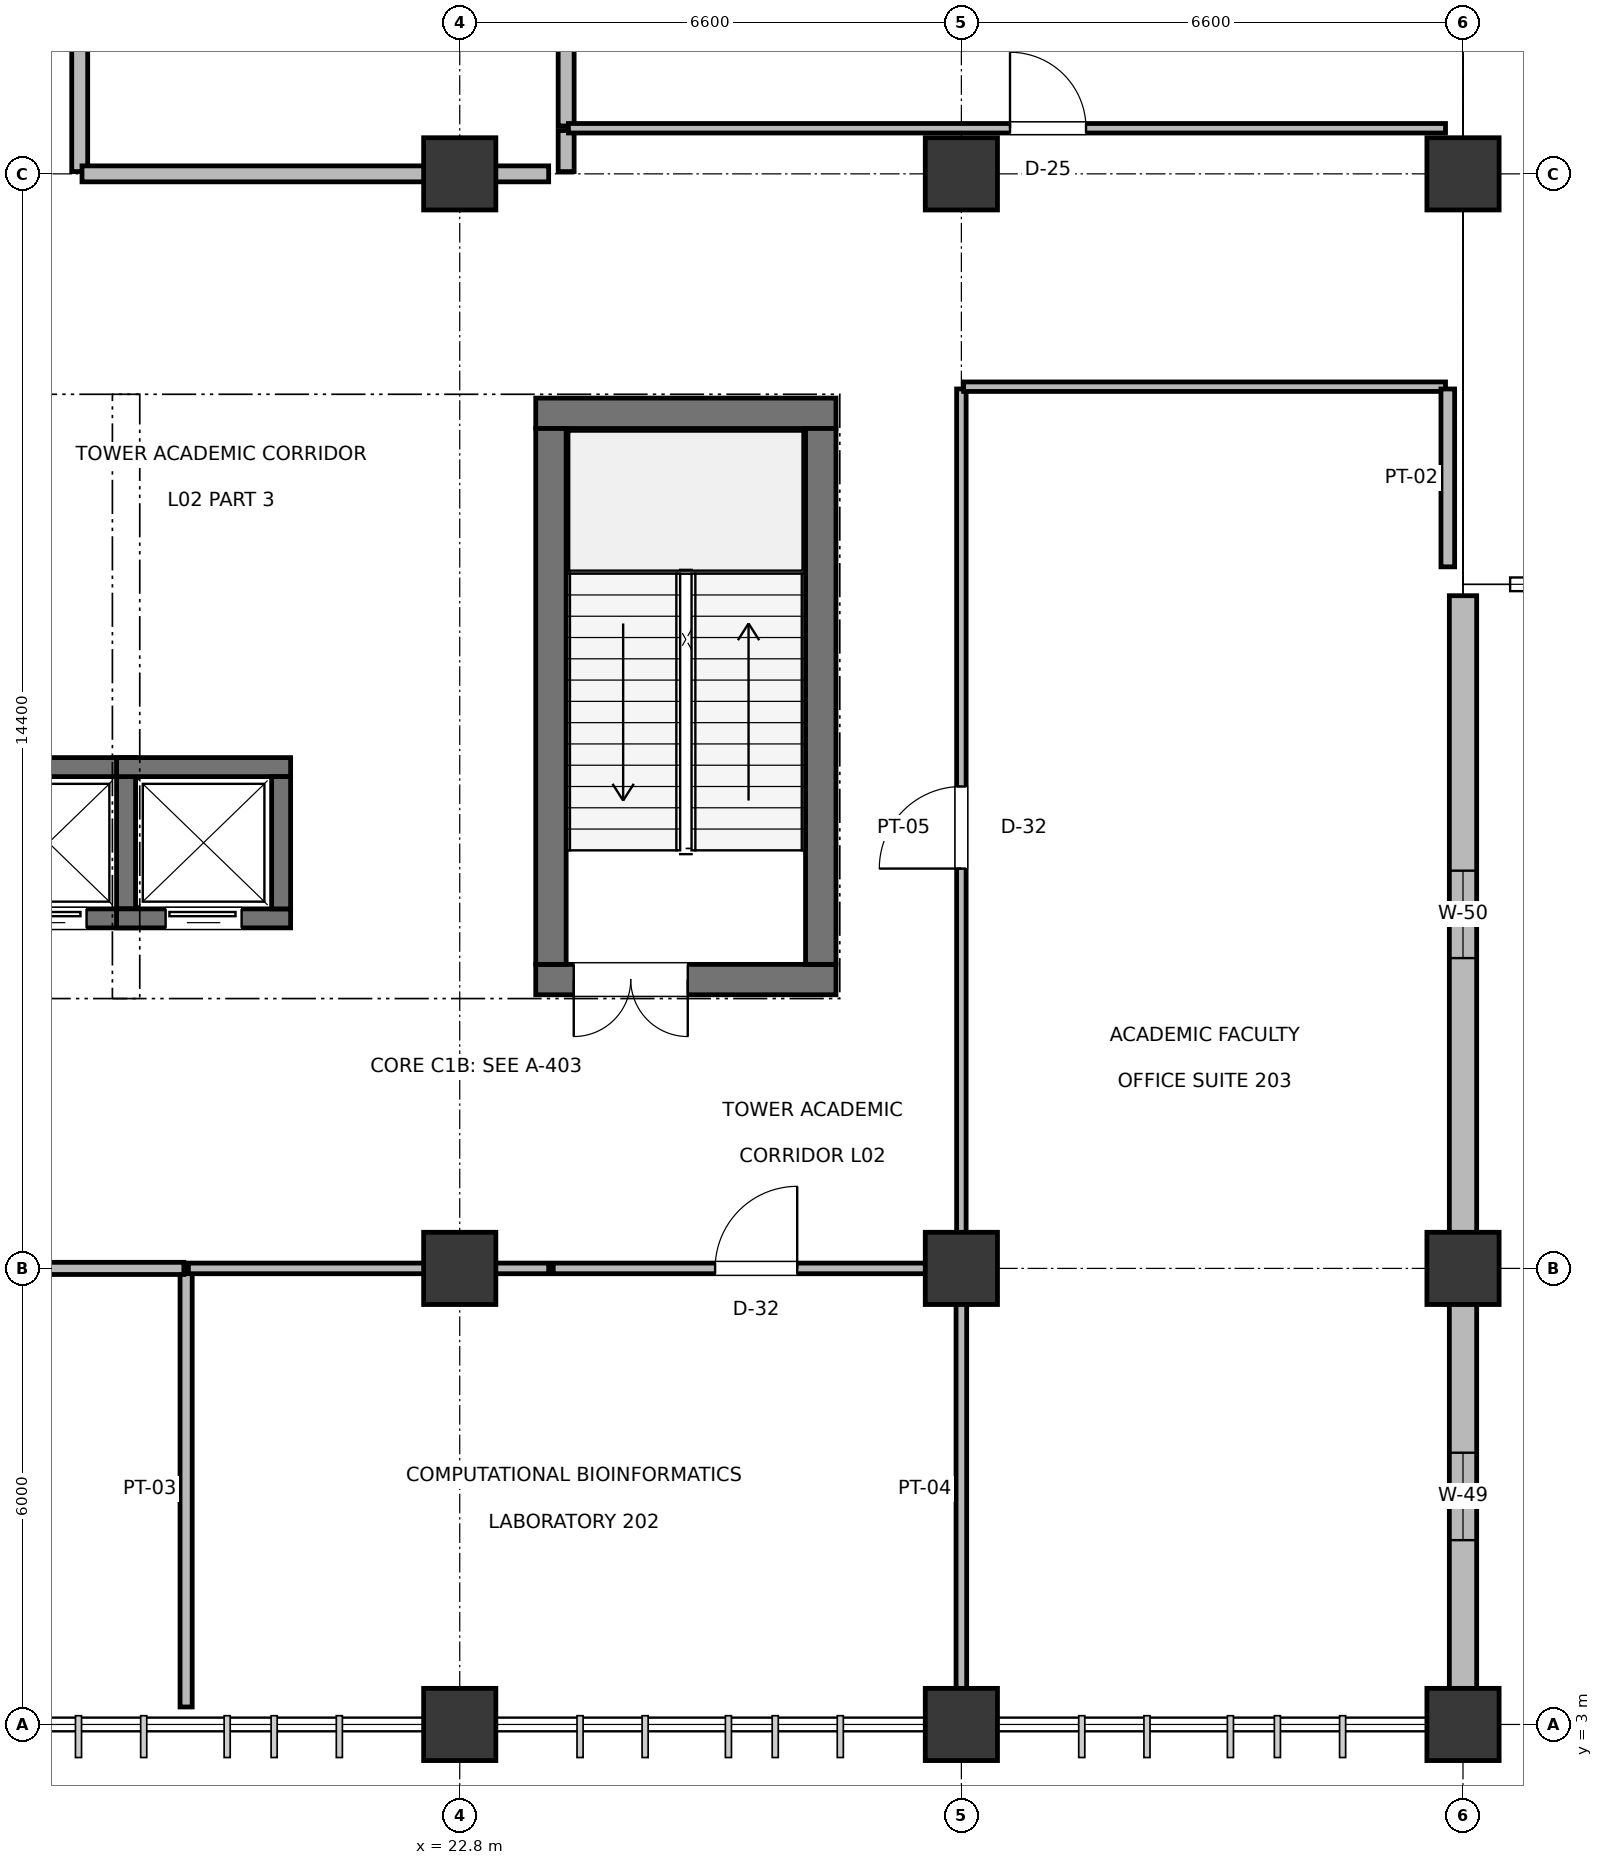
"""IFC4 building model, lengths in metres.
Left out: names, types, materials, properties, quantities, classifications, styles, units other than length and angle.
Written with IfcOpenShell. Run it as: python <this file> out.ifc"""

import sys

from ifc_helpers import new_model, si_unit, direction, frame, frame_2d, origin, origin_2d, place, context, subcontext, project, spatial, rectangle, extrude, element, fill, save


model = new_model("IFC4")
c1 = context("Model", 3, precision=1e-05, world=origin(), true_north=direction((0.0, 1.0)))
c2 = subcontext(c1, "Body", "Model", "MODEL_VIEW")
j1 = project(units=[si_unit("LENGTHUNIT", "METRE"), si_unit("PLANEANGLEUNIT", "RADIAN")], contexts=[c1])
p1 = place(None, origin())
s1 = spatial("IfcSite", under=j1, at=p1, CompositionType="ELEMENT")
p2 = place(p1, origin())
s2 = spatial("IfcBuilding", under=s1, at=p2, CompositionType="ELEMENT")
p3 = place(p2, frame((0.0, 0.0, 10.2)))
s3 = spatial("IfcBuildingStorey", under=s2, at=p3, CompositionType="ELEMENT", Elevation=10.2)
for number, where, z_axis, x_axis in (
    (1, (22.8, 3.0, 0.0), (0.0, 0.0, 1.0), (1.0, 0.0, 0.0)),
    (2, (22.8, 9.0, 0.0), (0.0, 0.0, 1.0), (1.0, 0.0, 0.0)),
    (3, (22.8, 23.4, 0.0), (0.0, 0.0, 1.0), (1.0, 0.0, 0.0)),
    (4, (29.4, 3.0, 0.0), (0.0, 0.0, 1.0), (1.0, 0.0, 0.0)),
    (5, (29.4, 9.0, 0.0), (0.0, 0.0, 1.0), (1.0, 0.0, 0.0)),
    (6, (29.4, 23.4, 0.0), (0.0, 0.0, 1.0), (1.0, 0.0, 0.0)),
    (7, (36.0, 3.0, 0.0), (0.0, 0.0, 1.0), (1.0, 0.0, 0.0)),
    (8, (36.0, 9.0, 0.0), (0.0, 0.0, 1.0), (1.0, 0.0, 0.0)),
    (9, (36.0, 23.4, 0.0), (0.0, 0.0, 1.0), (1.0, 0.0, 0.0)),
):
    element("IfcColumn", number, at=place(p3, frame(where, z_axis=z_axis, x_axis=x_axis)), inside=s3, PredefinedType="COLUMN", context=c2, shape_type="SweptSolid", body=[
        extrude(rectangle(XDim=0.95, YDim=0.95, at=origin_2d()), origin(), (0.0, 0.0, 1.0), 4.8),
    ])
p4 = place(p3, frame((36.0, 3.465, 0.0), z_axis=(0.0, 0.0, 1.0), x_axis=(0.0, 1.0, 0.0)))
e10 = element("IfcWall", 10, at=p4, inside=s3, PredefinedType="SOLIDWALL", context=c2, shape_type="SweptSolid", body=[
    extrude(rectangle(XDim=5.07, YDim=0.36, at=frame_2d((2.535, 0.0))), origin(), (0.0, 0.0, 1.0), 3.925),
])
p5 = place(p4, frame((1.96, 0.0, 0.9)))
e11 = element("IfcOpeningElement", 11, at=p5, cuts=e10, PredefinedType="OPENING", context=c2, shape_type="SweptSolid", body=[
    extrude(rectangle(XDim=1.15, YDim=1.15, at=frame_2d((0.575, 0.575))), frame((0.0, 0.19, 0.0), z_axis=(0.0, -1.0, 0.0), x_axis=(1.0, 0.0, 0.0)), (0.0, 0.0, 1.0), 0.38),
])
p6 = place(p3, frame((36.0, 9.465, 0.0), z_axis=(0.0, 0.0, 1.0), x_axis=(0.0, 1.0, 0.0)))
e12 = element("IfcWall", 12, at=p6, inside=s3, PredefinedType="SOLIDWALL", context=c2, shape_type="SweptSolid", body=[
    extrude(rectangle(XDim=8.385, YDim=0.36, at=frame_2d((4.192, 0.0))), origin(), (0.0, 0.0, 1.0), 3.725),
])
p7 = place(p6, frame((3.617, 0.0, 0.9)))
e13 = element("IfcOpeningElement", 13, at=p7, cuts=e12, PredefinedType="OPENING", context=c2, shape_type="SweptSolid", body=[
    extrude(rectangle(XDim=1.15, YDim=1.35, at=frame_2d((0.575, 0.675))), frame((0.0, 0.19, 0.0), z_axis=(0.0, -1.0, 0.0), x_axis=(1.0, 0.0, 0.0)), (0.0, 0.0, 1.0), 0.38),
])
p8 = place(p3, frame((16.245, 13.605, 0.0), z_axis=(0.0, 0.0, 1.0), x_axis=(1.0, 0.0, 0.0)))
e14 = element("IfcWall", 14, at=p8, inside=s3, PredefinedType="SHEAR", context=c2, shape_type="SweptSolid", body=[
    extrude(rectangle(XDim=2.29, YDim=0.25, at=frame_2d((1.145, 0.0))), origin(), (0.0, 0.0, 1.0), 4.56),
])
p9 = place(p8, frame((0.645, 0.0, 0.0)))
e15 = element("IfcOpeningElement", 15, at=p9, cuts=e14, PredefinedType="OPENING", context=c2, shape_type="SweptSolid", body=[
    extrude(rectangle(XDim=1.0, YDim=2.15, at=frame_2d((0.5, 1.075))), frame((0.0, 0.135, 0.0), z_axis=(0.0, -1.0, 0.0), x_axis=(1.0, 0.0, 0.0)), (0.0, 0.0, 1.0), 0.27),
])
p10 = place(p3, frame((16.245, 15.595, 0.0), z_axis=(0.0, 0.0, 1.0), x_axis=(1.0, 0.0, 0.0)))
e16 = element("IfcWall", 16, at=p10, inside=s3, PredefinedType="SHEAR", context=c2, shape_type="SweptSolid", body=[
    extrude(rectangle(XDim=2.29, YDim=0.25, at=frame_2d((1.145, 0.0))), origin(), (0.0, 0.0, 1.0), 4.56),
])
p11 = place(p3, frame((18.41, 13.73, 0.0), z_axis=(0.0, 0.0, 1.0), x_axis=(0.0, 1.0, 0.0)))
e17 = element("IfcWall", 17, at=p11, inside=s3, PredefinedType="SHEAR", context=c2, shape_type="SweptSolid", body=[
    extrude(rectangle(XDim=1.74, YDim=0.25, at=frame_2d((0.87, 0.0))), origin(), (0.0, 0.0, 1.0), 4.56),
])
p12 = place(p3, frame((23.8, 12.8, 0.0), z_axis=(0.0, 0.0, 1.0), x_axis=(1.0, 0.0, 0.0)))
e18 = element("IfcWall", 18, at=p12, inside=s3, PredefinedType="SHEAR", context=c2, shape_type="SweptSolid", body=[
    extrude(rectangle(XDim=3.95, YDim=0.4, at=frame_2d((1.975, 0.0))), origin(), (0.0, 0.0, 1.0), 4.58),
])
p13 = place(p12, frame((0.5, 0.0, 0.0)))
e19 = element("IfcOpeningElement", 19, at=p13, cuts=e18, PredefinedType="OPENING", context=c2, shape_type="SweptSolid", body=[
    extrude(rectangle(XDim=1.5, YDim=2.2, at=frame_2d((0.75, 1.1))), frame((0.0, 0.21, 0.0), z_axis=(0.0, -1.0, 0.0), x_axis=(1.0, 0.0, 0.0)), (0.0, 0.0, 1.0), 0.42),
])
p14 = place(p3, frame((23.8, 20.25, 0.0), z_axis=(0.0, 0.0, 1.0), x_axis=(1.0, 0.0, 0.0)))
e20 = element("IfcWall", 20, at=p14, inside=s3, PredefinedType="SHEAR", context=c2, shape_type="SweptSolid", body=[
    extrude(rectangle(XDim=3.95, YDim=0.4, at=frame_2d((1.975, 0.0))), origin(), (0.0, 0.0, 1.0), 4.58),
])
for number, where, z_axis, x_axis in (
    (21, (24.0, 13.0, 0.0), (0.0, 0.0, 1.0), (0.0, 1.0, 0.0)),
    (22, (27.55, 13.0, 0.0), (0.0, 0.0, 1.0), (0.0, 1.0, 0.0)),
):
    element("IfcWall", number, at=place(p3, frame(where, z_axis=z_axis, x_axis=x_axis)), inside=s3, PredefinedType="SHEAR", context=c2, shape_type="SweptSolid", body=[
        extrude(rectangle(XDim=7.05, YDim=0.4, at=frame_2d((3.525, 0.0))), origin(), (0.0, 0.0, 1.0), 4.58),
    ])
p15 = place(p3, frame((18.285, 13.605, 0.0), z_axis=(0.0, 0.0, 1.0), x_axis=(1.0, 0.0, 0.0)))
e23 = element("IfcWall", 23, at=p15, inside=s3, PredefinedType="SHEAR", context=c2, shape_type="SweptSolid", body=[
    extrude(rectangle(XDim=2.29, YDim=0.25, at=frame_2d((1.145, 0.0))), origin(), (0.0, 0.0, 1.0), 4.56),
])
p16 = place(p15, frame((0.645, 0.0, 0.0)))
e24 = element("IfcOpeningElement", 24, at=p16, cuts=e23, PredefinedType="OPENING", context=c2, shape_type="SweptSolid", body=[
    extrude(rectangle(XDim=1.0, YDim=2.15, at=frame_2d((0.5, 1.075))), frame((0.0, 0.135, 0.0), z_axis=(0.0, -1.0, 0.0), x_axis=(1.0, 0.0, 0.0)), (0.0, 0.0, 1.0), 0.27),
])
p17 = place(p3, frame((18.285, 15.595, 0.0), z_axis=(0.0, 0.0, 1.0), x_axis=(1.0, 0.0, 0.0)))
e25 = element("IfcWall", 25, at=p17, inside=s3, PredefinedType="SHEAR", context=c2, shape_type="SweptSolid", body=[
    extrude(rectangle(XDim=2.29, YDim=0.25, at=frame_2d((1.145, 0.0))), origin(), (0.0, 0.0, 1.0), 4.56),
])
p18 = place(p3, frame((20.45, 13.73, 0.0), z_axis=(0.0, 0.0, 1.0), x_axis=(0.0, 1.0, 0.0)))
e26 = element("IfcWall", 26, at=p18, inside=s3, PredefinedType="SHEAR", context=c2, shape_type="SweptSolid", body=[
    extrude(rectangle(XDim=1.74, YDim=0.25, at=frame_2d((0.87, 0.0))), origin(), (0.0, 0.0, 1.0), 4.56),
])
p19 = place(p3, frame((19.2, 3.23, 0.0), z_axis=(0.0, 0.0, 1.0), x_axis=(0.0, 1.0, 0.0)))
e27 = element("IfcWall", 27, at=p19, inside=s3, PredefinedType="PARTITIONING", context=c2, shape_type="SweptSolid", body=[
    extrude(rectangle(XDim=5.74, YDim=0.16, at=frame_2d((2.87, 0.0))), origin(), (0.0, 0.0, 1.0), 3.825),
])
p20 = place(p3, frame((10.83, 9.0, 0.0), z_axis=(0.0, 0.0, 1.0), x_axis=(1.0, 0.0, 0.0)))
e28 = element("IfcWall", 28, at=p20, inside=s3, PredefinedType="PARTITIONING", context=c2, shape_type="SweptSolid", body=[
    extrude(rectangle(XDim=8.34, YDim=0.16, at=frame_2d((4.17, 0.0))), origin(), (0.0, 0.0, 1.0), 3.695),
])
p21 = place(p20, frame((3.34, 0.0, 0.0)))
e29 = element("IfcOpeningElement", 29, at=p21, cuts=e28, PredefinedType="OPENING", context=c2, shape_type="SweptSolid", body=[
    extrude(rectangle(XDim=1.3, YDim=2.2, at=frame_2d((0.65, 1.1))), frame((0.0, 0.09, 0.0), z_axis=(0.0, -1.0, 0.0), x_axis=(1.0, 0.0, 0.0)), (0.0, 0.0, 1.0), 0.18),
])
p22 = place(p3, frame((29.4, 3.23, 0.0), z_axis=(0.0, 0.0, 1.0), x_axis=(0.0, 1.0, 0.0)))
e30 = element("IfcWall", 30, at=p22, inside=s3, PredefinedType="PARTITIONING", context=c2, shape_type="SweptSolid", body=[
    extrude(rectangle(XDim=5.74, YDim=0.14, at=frame_2d((2.87, 0.0))), origin(), (0.0, 0.0, 1.0), 3.925),
])
p23 = place(p3, frame((24.03, 9.0, 0.0), z_axis=(0.0, 0.0, 1.0), x_axis=(1.0, 0.0, 0.0)))
e31 = element("IfcWall", 31, at=p23, inside=s3, PredefinedType="PARTITIONING", context=c2, shape_type="SweptSolid", body=[
    extrude(rectangle(XDim=5.34, YDim=0.14, at=frame_2d((2.67, 0.0))), origin(), (0.0, 0.0, 1.0), 3.715),
])
p24 = place(p23, frame((2.13, 0.0, 0.0)))
e32 = element("IfcOpeningElement", 32, at=p24, cuts=e31, PredefinedType="OPENING", context=c2, shape_type="SweptSolid", body=[
    extrude(rectangle(XDim=1.08, YDim=2.15, at=frame_2d((0.54, 1.075))), frame((0.0, 0.08, 0.0), z_axis=(0.0, -1.0, 0.0), x_axis=(1.0, 0.0, 0.0)), (0.0, 0.0, 1.0), 0.16),
])
p25 = place(p3, frame((19.23, 9.0, 0.0), z_axis=(0.0, 0.0, 1.0), x_axis=(1.0, 0.0, 0.0)))
e33 = element("IfcWall", 33, at=p25, inside=s3, PredefinedType="PARTITIONING", context=c2, shape_type="SweptSolid", body=[
    extrude(rectangle(XDim=4.74, YDim=0.14, at=frame_2d((2.37, 0.0))), origin(), (0.0, 0.0, 1.0), 3.715),
])
p26 = place(p3, frame((29.4, 9.03, 0.0), z_axis=(0.0, 0.0, 1.0), x_axis=(0.0, 1.0, 0.0)))
e34 = element("IfcWall", 34, at=p26, inside=s3, PredefinedType="PARTITIONING", context=c2, shape_type="SweptSolid", body=[
    extrude(rectangle(XDim=11.54, YDim=0.125, at=frame_2d((5.77, 0.0))), origin(), (0.0, 0.0, 1.0), 3.725),
])
p27 = place(p26, frame((5.23, 0.0, 0.0)))
e35 = element("IfcOpeningElement", 35, at=p27, cuts=e34, PredefinedType="OPENING", context=c2, shape_type="SweptSolid", body=[
    extrude(rectangle(XDim=1.08, YDim=2.15, at=frame_2d((0.54, 1.075))), frame((0.0, 0.073, 0.0), z_axis=(0.0, -1.0, 0.0), x_axis=(1.0, 0.0, 0.0)), (0.0, 0.0, 1.0), 0.145),
])
p28 = place(p3, frame((29.43, 20.6, 0.0), z_axis=(0.0, 0.0, 1.0), x_axis=(1.0, 0.0, 0.0)))
e36 = element("IfcWall", 36, at=p28, inside=s3, PredefinedType="PARTITIONING", context=c2, shape_type="SweptSolid", body=[
    extrude(rectangle(XDim=6.34, YDim=0.125, at=frame_2d((3.17, 0.0))), origin(), (0.0, 0.0, 1.0), 3.725),
])
p29 = place(p3, frame((35.8, 18.23, 0.0), z_axis=(0.0, 0.0, 1.0), x_axis=(0.0, 1.0, 0.0)))
e37 = element("IfcWall", 37, at=p29, inside=s3, PredefinedType="PARTITIONING", context=c2, shape_type="SweptSolid", body=[
    extrude(rectangle(XDim=2.34, YDim=0.18, at=frame_2d((1.17, 0.0))), origin(), (0.0, 0.0, 1.0), 3.725),
])
p30 = place(p3, frame((24.2, 24.03, 0.0), z_axis=(0.0, 0.0, 1.0), x_axis=(0.0, 1.0, 0.0)))
e38 = element("IfcWall", 38, at=p30, inside=s3, PredefinedType="PLUMBINGWALL", context=c2, shape_type="SweptSolid", body=[
    extrude(rectangle(XDim=5.74, YDim=0.21, at=frame_2d((2.87, 0.0))), origin(), (0.0, 0.0, 1.0), 3.695),
])
p31 = place(p3, frame((24.2, 23.43, 0.0), z_axis=(0.0, 0.0, 1.0), x_axis=(0.0, 1.0, 0.0)))
e39 = element("IfcWall", 39, at=p31, inside=s3, PredefinedType="PLUMBINGWALL", context=c2, shape_type="SweptSolid", body=[
    extrude(rectangle(XDim=0.54, YDim=0.21, at=frame_2d((0.27, 0.0))), origin(), (0.0, 0.0, 1.0), 3.825),
])
p32 = place(p3, frame((17.8, 23.43, 0.0), z_axis=(0.0, 0.0, 1.0), x_axis=(0.0, 1.0, 0.0)))
e40 = element("IfcWall", 40, at=p32, inside=s3, PredefinedType="PLUMBINGWALL", context=c2, shape_type="SweptSolid", body=[
    extrude(rectangle(XDim=6.54, YDim=0.21, at=frame_2d((3.27, 0.0))), origin(), (0.0, 0.0, 1.0), 3.555),
])
p33 = place(p32, frame((2.81, 0.0, 0.0)))
e41 = element("IfcOpeningElement", 41, at=p33, cuts=e40, PredefinedType="OPENING", context=c2, shape_type="SweptSolid", body=[
    extrude(rectangle(XDim=0.92, YDim=2.1, at=frame_2d((0.46, 1.05))), frame((0.0, 0.115, 0.0), z_axis=(0.0, -1.0, 0.0), x_axis=(1.0, 0.0, 0.0)), (0.0, 0.0, 1.0), 0.23),
])
p34 = place(p3, frame((17.83, 23.4, 0.0), z_axis=(0.0, 0.0, 1.0), x_axis=(1.0, 0.0, 0.0)))
e42 = element("IfcWall", 42, at=p34, inside=s3, PredefinedType="PLUMBINGWALL", context=c2, shape_type="SweptSolid", body=[
    extrude(rectangle(XDim=6.14, YDim=0.21, at=frame_2d((3.07, 0.0))), origin(), (0.0, 0.0, 1.0), 3.555),
])
p35 = place(p3, frame((24.23, 24.0, 0.0), z_axis=(0.0, 0.0, 1.0), x_axis=(1.0, 0.0, 0.0)))
e43 = element("IfcWall", 43, at=p35, inside=s3, PredefinedType="PARTITIONING", context=c2, shape_type="SweptSolid", body=[
    extrude(rectangle(XDim=11.54, YDim=0.125, at=frame_2d((5.77, 0.0))), origin(), (0.0, 0.0, 1.0), 3.905),
])
p36 = place(p35, frame((5.81, 0.0, 0.0)))
e44 = element("IfcOpeningElement", 44, at=p36, cuts=e43, PredefinedType="OPENING", context=c2, shape_type="SweptSolid", body=[
    extrude(rectangle(XDim=1.0, YDim=2.15, at=frame_2d((0.5, 1.075))), frame((0.0, 0.073, 0.0), z_axis=(0.0, -1.0, 0.0), x_axis=(1.0, 0.0, 0.0)), (0.0, 0.0, 1.0), 0.145),
])
p37 = place(p5, frame((1.15, 0.0, 0.0), z_axis=(0.0, 0.0, 1.0), x_axis=(-1.0, 0.0, 0.0)))
e45 = element("IfcWindow", 45, at=p37, inside=s3, PartitioningType="DOUBLE_PANEL_VERTICAL", PredefinedType="WINDOW", context=c2, shape_type="SweptSolid", body=[
    extrude(rectangle(XDim=1.15, YDim=1.15, at=frame_2d((0.575, 0.575))), frame((0.0, 0.03, 0.0), z_axis=(0.0, -1.0, 0.0), x_axis=(1.0, 0.0, 0.0)), (0.0, 0.0, 1.0), 0.06),
])
fill(e11, e45)
p38 = place(p7, frame((1.15, 0.0, 0.0), z_axis=(0.0, 0.0, 1.0), x_axis=(-1.0, 0.0, 0.0)))
e46 = element("IfcWindow", 46, at=p38, inside=s3, PartitioningType="DOUBLE_PANEL_VERTICAL", PredefinedType="WINDOW", context=c2, shape_type="SweptSolid", body=[
    extrude(rectangle(XDim=1.15, YDim=1.35, at=frame_2d((0.575, 0.675))), frame((0.0, 0.03, 0.0), z_axis=(0.0, -1.0, 0.0), x_axis=(1.0, 0.0, 0.0)), (0.0, 0.0, 1.0), 0.06),
])
fill(e13, e46)
p39 = place(p9, frame((1.0, 0.0, 0.0), z_axis=(0.0, 0.0, 1.0), x_axis=(-1.0, 0.0, 0.0)))
e47 = element("IfcDoor", 47, at=p39, inside=s3, OperationType="SLIDING_TO_LEFT", PredefinedType="DOOR", context=c2, shape_type="SweptSolid", body=[
    extrude(rectangle(XDim=1.0, YDim=2.15, at=frame_2d((0.5, 1.075))), frame((0.0, 0.025, 0.0), z_axis=(0.0, -1.0, 0.0), x_axis=(1.0, 0.0, 0.0)), (0.0, 0.0, 1.0), 0.05),
])
fill(e15, e47)
p40 = place(p13, frame((1.5, 0.0, 0.0), z_axis=(0.0, 0.0, 1.0), x_axis=(-1.0, 0.0, 0.0)))
e48 = element("IfcDoor", 48, at=p40, inside=s3, OperationType="DOUBLE_DOOR_SINGLE_SWING", PredefinedType="DOOR", context=c2, shape_type="SweptSolid", body=[
    extrude(rectangle(XDim=1.5, YDim=2.2, at=frame_2d((0.75, 1.1))), frame((0.0, 0.025, 0.0), z_axis=(0.0, -1.0, 0.0), x_axis=(1.0, 0.0, 0.0)), (0.0, 0.0, 1.0), 0.05),
])
fill(e19, e48)
p41 = place(p16, frame((1.0, 0.0, 0.0), z_axis=(0.0, 0.0, 1.0), x_axis=(-1.0, 0.0, 0.0)))
e49 = element("IfcDoor", 49, at=p41, inside=s3, OperationType="SLIDING_TO_LEFT", PredefinedType="DOOR", context=c2, shape_type="SweptSolid", body=[
    extrude(rectangle(XDim=1.0, YDim=2.15, at=frame_2d((0.5, 1.075))), frame((0.0, 0.025, 0.0), z_axis=(0.0, -1.0, 0.0), x_axis=(1.0, 0.0, 0.0)), (0.0, 0.0, 1.0), 0.05),
])
fill(e24, e49)
p42 = place(p24, origin())
e50 = element("IfcDoor", 50, at=p42, inside=s3, OperationType="SINGLE_SWING_RIGHT", PredefinedType="DOOR", context=c2, shape_type="SweptSolid", body=[
    extrude(rectangle(XDim=1.08, YDim=2.15, at=frame_2d((0.54, 1.075))), frame((0.0, 0.025, 0.0), z_axis=(0.0, -1.0, 0.0), x_axis=(1.0, 0.0, 0.0)), (0.0, 0.0, 1.0), 0.05),
])
fill(e32, e50)
p43 = place(p27, origin())
e51 = element("IfcDoor", 51, at=p43, inside=s3, OperationType="SINGLE_SWING_LEFT", PredefinedType="DOOR", context=c2, shape_type="SweptSolid", body=[
    extrude(rectangle(XDim=1.08, YDim=2.15, at=frame_2d((0.54, 1.075))), frame((0.0, 0.025, 0.0), z_axis=(0.0, -1.0, 0.0), x_axis=(1.0, 0.0, 0.0)), (0.0, 0.0, 1.0), 0.05),
])
fill(e35, e51)
p44 = place(p36, origin())
e52 = element("IfcDoor", 52, at=p44, inside=s3, OperationType="SINGLE_SWING_LEFT", PredefinedType="DOOR", context=c2, shape_type="SweptSolid", body=[
    extrude(rectangle(XDim=1.0, YDim=2.15, at=frame_2d((0.5, 1.075))), frame((0.0, 0.025, 0.0), z_axis=(0.0, -1.0, 0.0), x_axis=(1.0, 0.0, 0.0)), (0.0, 0.0, 1.0), 0.05),
])
fill(e44, e52)
save(model, sys.argv[1])
